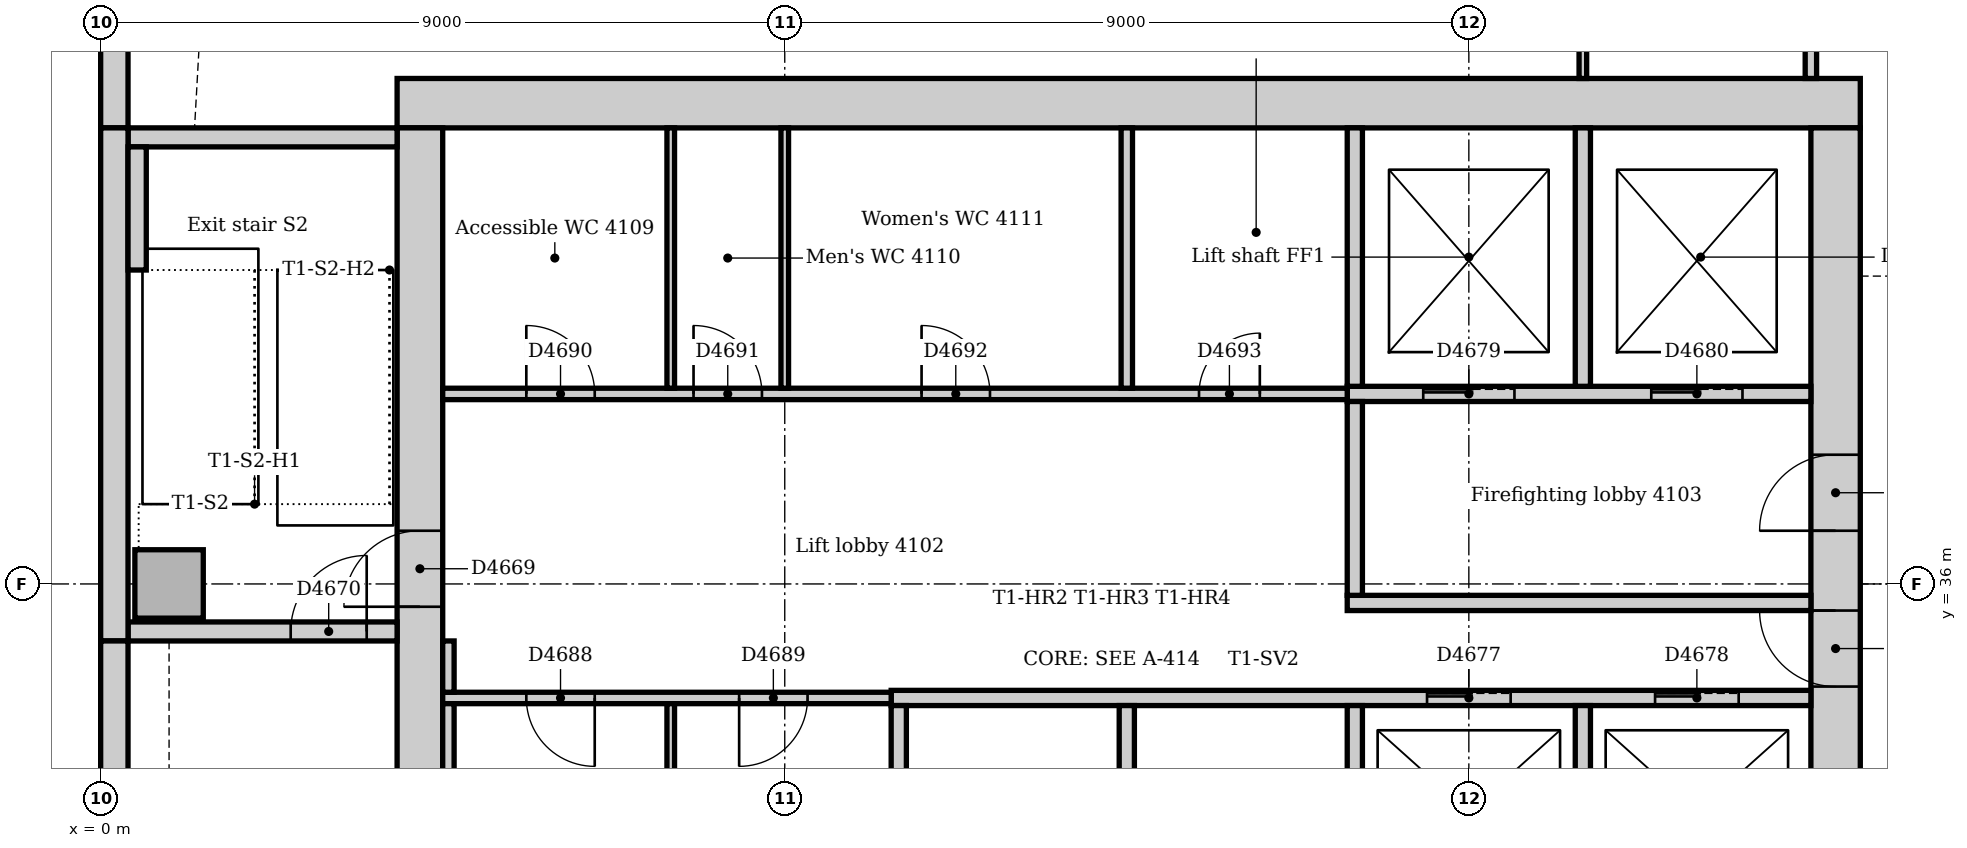
"""IFC4 building model, lengths in metres.
Left out: names, types, materials, properties, quantities, classifications, styles, units other than length and angle.
Written with IfcOpenShell. Run it as: python <this file> out.ifc"""

import sys

from ifc_helpers import new_model, si_unit, direction, frame, frame_2d, origin, origin_2d, place, context, subcontext, project, spatial, rectangle, extrude, element, fill, save


model = new_model("IFC4")
c1 = context("Model", 3, precision=1e-05, world=origin(), true_north=direction((0.0, 1.0)))
c2 = subcontext(c1, "Body", "Model", "MODEL_VIEW")
j1 = project(units=[si_unit("LENGTHUNIT", "METRE"), si_unit("PLANEANGLEUNIT", "RADIAN")], contexts=[c1])
p1 = place(None, origin())
s1 = spatial("IfcSite", under=j1, at=p1, CompositionType="ELEMENT")
p2 = place(p1, origin())
s2 = spatial("IfcBuilding", under=s1, at=p2, CompositionType="ELEMENT")
p3 = place(p2, frame((0.0, 0.0, 173.0)))
s3 = spatial("IfcBuildingStorey", under=s2, at=p3, CompositionType="ELEMENT", Elevation=173.0)
p4 = place(p3, frame((23.15, 42.325, 0.0), z_axis=(0.0, 0.0, 1.0), x_axis=(-1.0, 0.0, 0.0)))
e1 = element("IfcWall", 1, at=p4, inside=s3, PredefinedType="SOLIDWALL", context=c2, shape_type="SweptSolid", body=[
    extrude(rectangle(XDim=19.25, YDim=0.65, at=frame_2d((9.625, 0.0))), origin(), (0.0, 0.0, 1.0), 4.0),
])
p5 = place(p3, frame((22.825, 31.5, 0.0), z_axis=(0.0, 0.0, 1.0), x_axis=(0.0, 1.0, 0.0)))
e2 = element("IfcWall", 2, at=p5, inside=s3, PredefinedType="SOLIDWALL", context=c2, shape_type="SweptSolid", body=[
    extrude(rectangle(XDim=10.5, YDim=0.65, at=frame_2d((5.25, 0.0))), origin(), (0.0, 0.0, 1.0), 4.0),
])
p6 = place(p5, frame((3.15, 0.0, 0.0)))
e3 = element("IfcOpeningElement", 3, at=p6, cuts=e2, PredefinedType="OPENING", context=c2, shape_type="SweptSolid", body=[
    extrude(rectangle(XDim=1.0, YDim=2.1, at=frame_2d((0.5, 1.05))), frame((0.0, 0.335, 0.0), z_axis=(0.0, -1.0, 0.0), x_axis=(1.0, 0.0, 0.0)), (0.0, 0.0, 1.0), 0.67),
])
p7 = place(p5, frame((5.2, 0.0, 0.0)))
e4 = element("IfcOpeningElement", 4, at=p7, cuts=e2, PredefinedType="OPENING", context=c2, shape_type="SweptSolid", body=[
    extrude(rectangle(XDim=1.0, YDim=2.1, at=frame_2d((0.5, 1.05))), frame((0.0, 0.335, 0.0), z_axis=(0.0, -1.0, 0.0), x_axis=(1.0, 0.0, 0.0)), (0.0, 0.0, 1.0), 0.67),
])
p8 = place(p3, frame((4.2, 42.0, 0.0), z_axis=(0.0, 0.0, 1.0), x_axis=(0.0, -1.0, 0.0)))
e5 = element("IfcWall", 5, at=p8, inside=s3, PredefinedType="SOLIDWALL", context=c2, shape_type="SweptSolid", body=[
    extrude(rectangle(XDim=10.5, YDim=0.6, at=frame_2d((5.25, 0.0))), origin(), (0.0, 0.0, 1.0), 4.0),
])
p9 = place(p8, frame((5.3, 0.0, 0.0)))
e6 = element("IfcOpeningElement", 6, at=p9, cuts=e5, PredefinedType="OPENING", context=c2, shape_type="SweptSolid", body=[
    extrude(rectangle(XDim=1.0, YDim=2.1, at=frame_2d((0.5, 1.05))), frame((0.0, 0.31, 0.0), z_axis=(0.0, -1.0, 0.0), x_axis=(1.0, 0.0, 0.0)), (0.0, 0.0, 1.0), 0.62),
])
p10 = place(p3, frame((0.36, 35.375, 0.0), z_axis=(0.0, 0.0, 1.0), x_axis=(1.0, 0.0, 0.0)))
e7 = element("IfcWall", 7, at=p10, inside=s3, PredefinedType="SOLIDWALL", context=c2, shape_type="SweptSolid", body=[
    extrude(rectangle(XDim=3.54, YDim=0.25, at=frame_2d((1.77, 0.0))), origin(), (0.0, 0.0, 1.0), 4.0),
])
p11 = place(p10, frame((2.14, 0.0, 0.0)))
e8 = element("IfcOpeningElement", 8, at=p11, cuts=e7, PredefinedType="OPENING", context=c2, shape_type="SweptSolid", body=[
    extrude(rectangle(XDim=1.0, YDim=2.1, at=frame_2d((0.5, 1.05))), frame((0.0, 0.135, 0.0), z_axis=(0.0, -1.0, 0.0), x_axis=(1.0, 0.0, 0.0)), (0.0, 0.0, 1.0), 0.27),
])
p12 = place(p3, frame((3.9, 41.875, 0.0), z_axis=(0.0, 0.0, 1.0), x_axis=(-1.0, 0.0, 0.0)))
e9 = element("IfcWall", 9, at=p12, inside=s3, PredefinedType="SOLIDWALL", context=c2, shape_type="SweptSolid", body=[
    extrude(rectangle(XDim=3.54, YDim=0.25, at=frame_2d((1.77, 0.0))), origin(), (0.0, 0.0, 1.0), 4.0),
])
p13 = place(p3, frame((0.9, 36.0, 0.0), z_axis=(0.0, 0.0, 1.0), x_axis=(1.0, 0.0, 0.0)))
e10 = element("IfcColumn", 10, at=p13, inside=s3, PredefinedType="COLUMN", context=c2, shape_type="SweptSolid", body=[
    extrude(rectangle(XDim=0.9, YDim=0.9, at=origin_2d()), origin(), (0.0, 0.0, 1.0), 4.0),
])
p14 = place(p3, frame((0.18, 49.757, 0.0), z_axis=(0.0, 0.0, 1.0), x_axis=(0.0, -1.0, 0.0)))
e11 = element("IfcWall", 11, at=p14, inside=s3, PredefinedType="STANDARD", context=c2, shape_type="SweptSolid", body=[
    extrude(rectangle(XDim=7.757, YDim=0.36, at=frame_2d((3.879, 0.0))), origin(), (0.0, 0.0, 1.0), 3.85),
])
p15 = place(p14, frame((3.107, 0.0, 0.9)))
e12 = element("IfcOpeningElement", 12, at=p15, cuts=e11, PredefinedType="OPENING", context=c2, shape_type="SweptSolid", body=[
    extrude(rectangle(XDim=3.3, YDim=1.6, at=frame_2d((1.65, 0.8))), frame((0.0, 0.19, 0.0), z_axis=(0.0, -1.0, 0.0), x_axis=(1.0, 0.0, 0.0)), (0.0, 0.0, 1.0), 0.38),
])
p16 = place(p3, frame((0.18, 42.0, 0.0), z_axis=(0.0, 0.0, 1.0), x_axis=(0.0, -1.0, 0.0)))
e13 = element("IfcWall", 13, at=p16, inside=s3, PredefinedType="STANDARD", context=c2, shape_type="SweptSolid", body=[
    extrude(rectangle(XDim=6.75, YDim=0.36, at=frame_2d((3.375, 0.0))), origin(), (0.0, 0.0, 1.0), 3.85),
])
p17 = place(p3, frame((0.18, 35.25, 0.0), z_axis=(0.0, 0.0, 1.0), x_axis=(0.0, -1.0, 0.0)))
e14 = element("IfcWall", 14, at=p17, inside=s3, PredefinedType="STANDARD", context=c2, shape_type="SweptSolid", body=[
    extrude(rectangle(XDim=7.5, YDim=0.36, at=frame_2d((3.75, 0.0))), origin(), (0.0, 0.0, 1.0), 3.85),
])
p18 = place(p3, frame((0.48, 40.13, 0.0), z_axis=(0.0, 0.0, 1.0), x_axis=(0.0, 1.0, 0.0)))
e15 = element("IfcWall", 15, at=p18, inside=s3, PredefinedType="STANDARD", context=c2, shape_type="SweptSolid", body=[
    extrude(rectangle(XDim=1.62, YDim=0.24, at=frame_2d((0.81, 0.0))), origin(), (0.0, 0.0, 1.0), 4.0),
])
p19 = place(p3, frame((16.4, 35.75, 0.0), z_axis=(0.0, 0.0, 1.0), x_axis=(1.0, 0.0, 0.0)))
e16 = element("IfcWall", 16, at=p19, inside=s3, PredefinedType="PARTITIONING", context=c2, shape_type="SweptSolid", body=[
    extrude(rectangle(XDim=6.1, YDim=0.2, at=frame_2d((3.05, 0.0))), origin(), (0.0, 0.0, 1.0), 3.85),
])
p20 = place(p3, frame((16.4, 38.5, 0.0), z_axis=(0.0, 0.0, 1.0), x_axis=(1.0, 0.0, 0.0)))
e17 = element("IfcWall", 17, at=p20, inside=s3, PredefinedType="PARTITIONING", context=c2, shape_type="SweptSolid", body=[
    extrude(rectangle(XDim=6.1, YDim=0.2, at=frame_2d((3.05, 0.0))), origin(), (0.0, 0.0, 1.0), 3.85),
])
p21 = place(p20, frame((1.0, 0.0, 0.0)))
e18 = element("IfcOpeningElement", 18, at=p21, cuts=e17, PredefinedType="OPENING", context=c2, shape_type="SweptSolid", body=[
    extrude(rectangle(XDim=1.2, YDim=2.1, at=frame_2d((0.6, 1.05))), frame((0.0, 0.11, 0.0), z_axis=(0.0, -1.0, 0.0), x_axis=(1.0, 0.0, 0.0)), (0.0, 0.0, 1.0), 0.22),
])
p22 = place(p20, frame((4.0, 0.0, 0.0)))
e19 = element("IfcOpeningElement", 19, at=p22, cuts=e17, PredefinedType="OPENING", context=c2, shape_type="SweptSolid", body=[
    extrude(rectangle(XDim=1.2, YDim=2.1, at=frame_2d((0.6, 1.05))), frame((0.0, 0.11, 0.0), z_axis=(0.0, -1.0, 0.0), x_axis=(1.0, 0.0, 0.0)), (0.0, 0.0, 1.0), 0.22),
])
p23 = place(p3, frame((16.5, 35.85, 0.0), z_axis=(0.0, 0.0, 1.0), x_axis=(0.0, 1.0, 0.0)))
e20 = element("IfcWall", 20, at=p23, inside=s3, PredefinedType="PARTITIONING", context=c2, shape_type="SweptSolid", body=[
    extrude(rectangle(XDim=2.55, YDim=0.2, at=frame_2d((1.275, 0.0))), origin(), (0.0, 0.0, 1.0), 3.85),
])
p24 = place(p3, frame((10.4, 34.5, 0.0), z_axis=(0.0, 0.0, 1.0), x_axis=(1.0, 0.0, 0.0)))
e21 = element("IfcWall", 21, at=p24, inside=s3, PredefinedType="PARTITIONING", context=c2, shape_type="SweptSolid", body=[
    extrude(rectangle(XDim=12.1, YDim=0.2, at=frame_2d((6.05, 0.0))), origin(), (0.0, 0.0, 1.0), 3.85),
])
p25 = place(p24, frame((7.05, 0.0, 0.0)))
e22 = element("IfcOpeningElement", 22, at=p25, cuts=e21, PredefinedType="OPENING", context=c2, shape_type="SweptSolid", body=[
    extrude(rectangle(XDim=1.1, YDim=2.1, at=frame_2d((0.55, 1.05))), frame((0.0, 0.11, 0.0), z_axis=(0.0, -1.0, 0.0), x_axis=(1.0, 0.0, 0.0)), (0.0, 0.0, 1.0), 0.22),
])
p26 = place(p24, frame((10.05, 0.0, 0.0)))
e23 = element("IfcOpeningElement", 23, at=p26, cuts=e21, PredefinedType="OPENING", context=c2, shape_type="SweptSolid", body=[
    extrude(rectangle(XDim=1.1, YDim=2.1, at=frame_2d((0.55, 1.05))), frame((0.0, 0.11, 0.0), z_axis=(0.0, -1.0, 0.0), x_axis=(1.0, 0.0, 0.0)), (0.0, 0.0, 1.0), 0.22),
])
for number, where, z_axis, x_axis in (
    (24, (10.5, 31.75, 0.0), (0.0, 0.0, 1.0), (0.0, 1.0, 0.0)),
    (25, (13.5, 31.75, 0.0), (0.0, 0.0, 1.0), (0.0, 1.0, 0.0)),
    (26, (16.5, 31.75, 0.0), (0.0, 0.0, 1.0), (0.0, 1.0, 0.0)),
    (27, (19.5, 31.75, 0.0), (0.0, 0.0, 1.0), (0.0, 1.0, 0.0)),
):
    element("IfcWall", number, at=place(p3, frame(where, z_axis=z_axis, x_axis=x_axis)), inside=s3, PredefinedType="PARTITIONING", context=c2, shape_type="SweptSolid", body=[
        extrude(rectangle(XDim=2.65, YDim=0.2, at=frame_2d((1.325, 0.0))), origin(), (0.0, 0.0, 1.0), 3.85),
    ])
for number, where, z_axis, x_axis in (
    (28, (16.5, 38.6, 0.0), (0.0, 0.0, 1.0), (0.0, 1.0, 0.0)),
    (29, (19.5, 38.6, 0.0), (0.0, 0.0, 1.0), (0.0, 1.0, 0.0)),
):
    element("IfcWall", number, at=place(p3, frame(where, z_axis=z_axis, x_axis=x_axis)), inside=s3, PredefinedType="PARTITIONING", context=c2, shape_type="SweptSolid", body=[
        extrude(rectangle(XDim=3.4, YDim=0.2, at=frame_2d((1.7, 0.0))), origin(), (0.0, 0.0, 1.0), 3.85),
    ])
p27 = place(p3, frame((4.5, 38.5, 0.0), z_axis=(0.0, 0.0, 1.0), x_axis=(1.0, 0.0, 0.0)))
e30 = element("IfcWall", 30, at=p27, inside=s3, PredefinedType="PARTITIONING", context=c2, shape_type="SweptSolid", body=[
    extrude(rectangle(XDim=11.9, YDim=0.15, at=frame_2d((5.95, 0.0))), origin(), (0.0, 0.0, 1.0), 3.85),
])
p28 = place(p27, frame((1.1, 0.0, 0.0)))
e31 = element("IfcOpeningElement", 31, at=p28, cuts=e30, PredefinedType="OPENING", context=c2, shape_type="SweptSolid", body=[
    extrude(rectangle(XDim=0.9, YDim=2.1, at=frame_2d((0.45, 1.05))), frame((0.0, 0.085, 0.0), z_axis=(0.0, -1.0, 0.0), x_axis=(1.0, 0.0, 0.0)), (0.0, 0.0, 1.0), 0.17),
])
p29 = place(p27, frame((3.3, 0.0, 0.0)))
e32 = element("IfcOpeningElement", 32, at=p29, cuts=e30, PredefinedType="OPENING", context=c2, shape_type="SweptSolid", body=[
    extrude(rectangle(XDim=0.9, YDim=2.1, at=frame_2d((0.45, 1.05))), frame((0.0, 0.085, 0.0), z_axis=(0.0, -1.0, 0.0), x_axis=(1.0, 0.0, 0.0)), (0.0, 0.0, 1.0), 0.17),
])
p30 = place(p27, frame((6.3, 0.0, 0.0)))
e33 = element("IfcOpeningElement", 33, at=p30, cuts=e30, PredefinedType="OPENING", context=c2, shape_type="SweptSolid", body=[
    extrude(rectangle(XDim=0.9, YDim=2.1, at=frame_2d((0.45, 1.05))), frame((0.0, 0.085, 0.0), z_axis=(0.0, -1.0, 0.0), x_axis=(1.0, 0.0, 0.0)), (0.0, 0.0, 1.0), 0.17),
])
p31 = place(p27, frame((9.95, 0.0, 0.0)))
e34 = element("IfcOpeningElement", 34, at=p31, cuts=e30, PredefinedType="OPENING", context=c2, shape_type="SweptSolid", body=[
    extrude(rectangle(XDim=0.8, YDim=2.1, at=frame_2d((0.4, 1.05))), frame((0.0, 0.085, 0.0), z_axis=(0.0, -1.0, 0.0), x_axis=(1.0, 0.0, 0.0)), (0.0, 0.0, 1.0), 0.17),
])
p32 = place(p3, frame((4.5, 34.5, 0.0), z_axis=(0.0, 0.0, 1.0), x_axis=(1.0, 0.0, 0.0)))
e35 = element("IfcWall", 35, at=p32, inside=s3, PredefinedType="PARTITIONING", context=c2, shape_type="SweptSolid", body=[
    extrude(rectangle(XDim=5.9, YDim=0.15, at=frame_2d((2.95, 0.0))), origin(), (0.0, 0.0, 1.0), 3.85),
])
p33 = place(p32, frame((1.1, 0.0, 0.0)))
e36 = element("IfcOpeningElement", 36, at=p33, cuts=e35, PredefinedType="OPENING", context=c2, shape_type="SweptSolid", body=[
    extrude(rectangle(XDim=0.9, YDim=2.1, at=frame_2d((0.45, 1.05))), frame((0.0, 0.085, 0.0), z_axis=(0.0, -1.0, 0.0), x_axis=(1.0, 0.0, 0.0)), (0.0, 0.0, 1.0), 0.17),
])
p34 = place(p32, frame((3.9, 0.0, 0.0)))
e37 = element("IfcOpeningElement", 37, at=p34, cuts=e35, PredefinedType="OPENING", context=c2, shape_type="SweptSolid", body=[
    extrude(rectangle(XDim=0.9, YDim=2.1, at=frame_2d((0.45, 1.05))), frame((0.0, 0.085, 0.0), z_axis=(0.0, -1.0, 0.0), x_axis=(1.0, 0.0, 0.0)), (0.0, 0.0, 1.0), 0.17),
])
p35 = place(p3, frame((4.575, 34.575, 0.0), z_axis=(0.0, 0.0, 1.0), x_axis=(0.0, 1.0, 0.0)))
e38 = element("IfcWall", 38, at=p35, inside=s3, PredefinedType="PARTITIONING", context=c2, shape_type="SweptSolid", body=[
    extrude(rectangle(XDim=0.675, YDim=0.15, at=frame_2d((0.338, 0.0))), origin(), (0.0, 0.0, 1.0), 3.85),
])
p36 = place(p3, frame((4.575, 31.75, 0.0), z_axis=(0.0, 0.0, 1.0), x_axis=(0.0, 1.0, 0.0)))
e39 = element("IfcWall", 39, at=p36, inside=s3, PredefinedType="PARTITIONING", context=c2, shape_type="SweptSolid", body=[
    extrude(rectangle(XDim=2.675, YDim=0.15, at=frame_2d((1.337, 0.0))), origin(), (0.0, 0.0, 1.0), 3.85),
])
p37 = place(p3, frame((22.5, 42.65, 0.0), z_axis=(0.0, 0.0, 1.0), x_axis=(0.0, 1.0, 0.0)))
e40 = element("IfcWall", 40, at=p37, inside=s3, PredefinedType="PARTITIONING", context=c2, shape_type="SweptSolid", body=[
    extrude(rectangle(XDim=2.275, YDim=0.15, at=frame_2d((1.137, 0.0))), origin(), (0.0, 0.0, 1.0), 3.85),
])
p38 = place(p3, frame((13.5, 38.575, 0.0), z_axis=(0.0, 0.0, 1.0), x_axis=(0.0, 1.0, 0.0)))
e41 = element("IfcWall", 41, at=p38, inside=s3, PredefinedType="PARTITIONING", context=c2, shape_type="SweptSolid", body=[
    extrude(rectangle(XDim=3.425, YDim=0.15, at=frame_2d((1.712, 0.0))), origin(), (0.0, 0.0, 1.0), 3.85),
])
p39 = place(p3, frame((19.5, 42.65, 0.0), z_axis=(0.0, 0.0, 1.0), x_axis=(0.0, 1.0, 0.0)))
e42 = element("IfcWall", 42, at=p39, inside=s3, PredefinedType="PARTITIONING", context=c2, shape_type="SweptSolid", body=[
    extrude(rectangle(XDim=10.99, YDim=0.1, at=frame_2d((5.495, 0.0))), origin(), (0.0, 0.0, 1.0), 3.85),
])
p40 = place(p39, frame((5.05, 0.0, 0.0)))
e43 = element("IfcOpeningElement", 43, at=p40, cuts=e42, PredefinedType="OPENING", context=c2, shape_type="SweptSolid", body=[
    extrude(rectangle(XDim=0.9, YDim=2.1, at=frame_2d((0.45, 1.05))), frame((0.0, 0.06, 0.0), z_axis=(0.0, -1.0, 0.0), x_axis=(1.0, 0.0, 0.0)), (0.0, 0.0, 1.0), 0.12),
])
for number, where, z_axis, x_axis in (
    (44, (7.5, 38.575, 0.0), (0.0, 0.0, 1.0), (0.0, 1.0, 0.0)),
    (45, (9.0, 38.575, 0.0), (0.0, 0.0, 1.0), (0.0, 1.0, 0.0)),
):
    element("IfcWall", number, at=place(p3, frame(where, z_axis=z_axis, x_axis=x_axis)), inside=s3, PredefinedType="PARTITIONING", context=c2, shape_type="SweptSolid", body=[
        extrude(rectangle(XDim=3.425, YDim=0.1, at=frame_2d((1.712, 0.0))), origin(), (0.0, 0.0, 1.0), 3.85),
    ])
p41 = place(p3, frame((7.5, 31.75, 0.0), z_axis=(0.0, 0.0, 1.0), x_axis=(0.0, 1.0, 0.0)))
e46 = element("IfcWall", 46, at=p41, inside=s3, PredefinedType="PARTITIONING", context=c2, shape_type="SweptSolid", body=[
    extrude(rectangle(XDim=2.675, YDim=0.1, at=frame_2d((1.337, 0.0))), origin(), (0.0, 0.0, 1.0), 3.85),
])
p42 = place(p9, frame((1.0, 0.0, 0.0), z_axis=(0.0, 0.0, 1.0), x_axis=(-1.0, 0.0, 0.0)))
e47 = element("IfcDoor", 47, at=p42, inside=s3, OperationType="SINGLE_SWING_LEFT", PredefinedType="DOOR", context=c2, shape_type="SweptSolid", body=[
    extrude(rectangle(XDim=1.0, YDim=2.1, at=frame_2d((0.5, 1.05))), frame((0.0, 0.025, 0.0), z_axis=(0.0, -1.0, 0.0), x_axis=(1.0, 0.0, 0.0)), (0.0, 0.0, 1.0), 0.05),
])
fill(e6, e47)
p43 = place(p11, origin())
e48 = element("IfcDoor", 48, at=p43, inside=s3, OperationType="SINGLE_SWING_RIGHT", PredefinedType="DOOR", context=c2, shape_type="SweptSolid", body=[
    extrude(rectangle(XDim=1.0, YDim=2.1, at=frame_2d((0.5, 1.05))), frame((0.0, 0.025, 0.0), z_axis=(0.0, -1.0, 0.0), x_axis=(1.0, 0.0, 0.0)), (0.0, 0.0, 1.0), 0.05),
])
fill(e8, e48)
p44 = place(p25, origin())
e49 = element("IfcDoor", 49, at=p44, inside=s3, OperationType="SLIDING_TO_LEFT", PredefinedType="DOOR", context=c2, shape_type="SweptSolid", body=[
    extrude(rectangle(XDim=1.1, YDim=2.1, at=frame_2d((0.55, 1.05))), frame((0.0, 0.025, 0.0), z_axis=(0.0, -1.0, 0.0), x_axis=(1.0, 0.0, 0.0)), (0.0, 0.0, 1.0), 0.05),
])
fill(e22, e49)
p45 = place(p26, origin())
e50 = element("IfcDoor", 50, at=p45, inside=s3, OperationType="SLIDING_TO_LEFT", PredefinedType="DOOR", context=c2, shape_type="SweptSolid", body=[
    extrude(rectangle(XDim=1.1, YDim=2.1, at=frame_2d((0.55, 1.05))), frame((0.0, 0.025, 0.0), z_axis=(0.0, -1.0, 0.0), x_axis=(1.0, 0.0, 0.0)), (0.0, 0.0, 1.0), 0.05),
])
fill(e23, e50)
p46 = place(p21, origin())
e51 = element("IfcDoor", 51, at=p46, inside=s3, OperationType="SLIDING_TO_LEFT", PredefinedType="DOOR", context=c2, shape_type="SweptSolid", body=[
    extrude(rectangle(XDim=1.2, YDim=2.1, at=frame_2d((0.6, 1.05))), frame((0.0, 0.025, 0.0), z_axis=(0.0, -1.0, 0.0), x_axis=(1.0, 0.0, 0.0)), (0.0, 0.0, 1.0), 0.05),
])
fill(e18, e51)
p47 = place(p22, origin())
e52 = element("IfcDoor", 52, at=p47, inside=s3, OperationType="SLIDING_TO_LEFT", PredefinedType="DOOR", context=c2, shape_type="SweptSolid", body=[
    extrude(rectangle(XDim=1.2, YDim=2.1, at=frame_2d((0.6, 1.05))), frame((0.0, 0.025, 0.0), z_axis=(0.0, -1.0, 0.0), x_axis=(1.0, 0.0, 0.0)), (0.0, 0.0, 1.0), 0.05),
])
fill(e19, e52)
p48 = place(p6, origin())
e53 = element("IfcDoor", 53, at=p48, inside=s3, OperationType="SINGLE_SWING_RIGHT", PredefinedType="DOOR", context=c2, shape_type="SweptSolid", body=[
    extrude(rectangle(XDim=1.0, YDim=2.1, at=frame_2d((0.5, 1.05))), frame((0.0, 0.025, 0.0), z_axis=(0.0, -1.0, 0.0), x_axis=(1.0, 0.0, 0.0)), (0.0, 0.0, 1.0), 0.05),
])
fill(e3, e53)
p49 = place(p7, origin())
e54 = element("IfcDoor", 54, at=p49, inside=s3, OperationType="SINGLE_SWING_LEFT", PredefinedType="DOOR", context=c2, shape_type="SweptSolid", body=[
    extrude(rectangle(XDim=1.0, YDim=2.1, at=frame_2d((0.5, 1.05))), frame((0.0, 0.025, 0.0), z_axis=(0.0, -1.0, 0.0), x_axis=(1.0, 0.0, 0.0)), (0.0, 0.0, 1.0), 0.05),
])
fill(e4, e54)
p50 = place(p33, frame((0.9, 0.0, 0.0), z_axis=(0.0, 0.0, 1.0), x_axis=(-1.0, 0.0, 0.0)))
e55 = element("IfcDoor", 55, at=p50, inside=s3, OperationType="SINGLE_SWING_LEFT", PredefinedType="DOOR", context=c2, shape_type="SweptSolid", body=[
    extrude(rectangle(XDim=0.9, YDim=2.1, at=frame_2d((0.45, 1.05))), frame((0.0, 0.025, 0.0), z_axis=(0.0, -1.0, 0.0), x_axis=(1.0, 0.0, 0.0)), (0.0, 0.0, 1.0), 0.05),
])
fill(e36, e55)
p51 = place(p34, frame((0.9, 0.0, 0.0), z_axis=(0.0, 0.0, 1.0), x_axis=(-1.0, 0.0, 0.0)))
e56 = element("IfcDoor", 56, at=p51, inside=s3, OperationType="SINGLE_SWING_RIGHT", PredefinedType="DOOR", context=c2, shape_type="SweptSolid", body=[
    extrude(rectangle(XDim=0.9, YDim=2.1, at=frame_2d((0.45, 1.05))), frame((0.0, 0.025, 0.0), z_axis=(0.0, -1.0, 0.0), x_axis=(1.0, 0.0, 0.0)), (0.0, 0.0, 1.0), 0.05),
])
fill(e37, e56)
p52 = place(p28, origin())
e57 = element("IfcDoor", 57, at=p52, inside=s3, OperationType="SINGLE_SWING_LEFT", PredefinedType="DOOR", context=c2, shape_type="SweptSolid", body=[
    extrude(rectangle(XDim=0.9, YDim=2.1, at=frame_2d((0.45, 1.05))), frame((0.0, 0.025, 0.0), z_axis=(0.0, -1.0, 0.0), x_axis=(1.0, 0.0, 0.0)), (0.0, 0.0, 1.0), 0.05),
])
fill(e31, e57)
p53 = place(p29, origin())
e58 = element("IfcDoor", 58, at=p53, inside=s3, OperationType="SINGLE_SWING_LEFT", PredefinedType="DOOR", context=c2, shape_type="SweptSolid", body=[
    extrude(rectangle(XDim=0.9, YDim=2.1, at=frame_2d((0.45, 1.05))), frame((0.0, 0.025, 0.0), z_axis=(0.0, -1.0, 0.0), x_axis=(1.0, 0.0, 0.0)), (0.0, 0.0, 1.0), 0.05),
])
fill(e32, e58)
p54 = place(p30, origin())
e59 = element("IfcDoor", 59, at=p54, inside=s3, OperationType="SINGLE_SWING_LEFT", PredefinedType="DOOR", context=c2, shape_type="SweptSolid", body=[
    extrude(rectangle(XDim=0.9, YDim=2.1, at=frame_2d((0.45, 1.05))), frame((0.0, 0.025, 0.0), z_axis=(0.0, -1.0, 0.0), x_axis=(1.0, 0.0, 0.0)), (0.0, 0.0, 1.0), 0.05),
])
fill(e33, e59)
p55 = place(p31, origin())
e60 = element("IfcDoor", 60, at=p55, inside=s3, OperationType="SINGLE_SWING_RIGHT", PredefinedType="DOOR", context=c2, shape_type="SweptSolid", body=[
    extrude(rectangle(XDim=0.8, YDim=2.1, at=frame_2d((0.4, 1.05))), frame((0.0, 0.025, 0.0), z_axis=(0.0, -1.0, 0.0), x_axis=(1.0, 0.0, 0.0)), (0.0, 0.0, 1.0), 0.05),
])
fill(e34, e60)
save(model, sys.argv[1])
